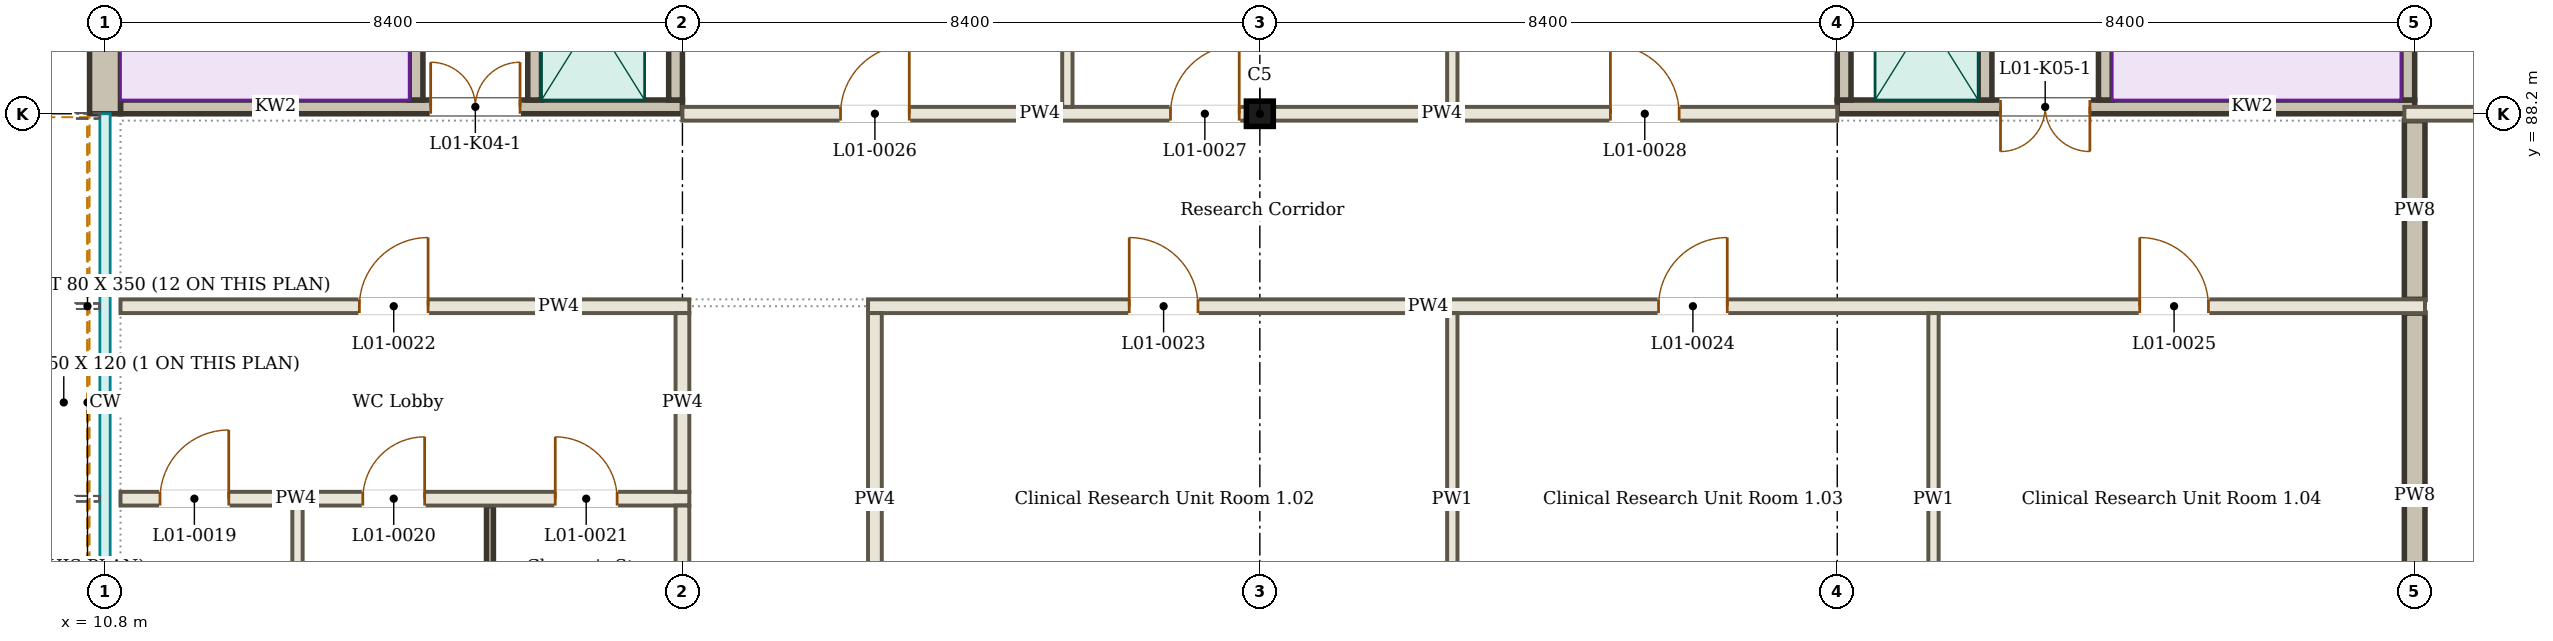
"""IFC4 building model, lengths in metres.
Left out: names, types, materials, properties, quantities, classifications, styles, units other than length and angle.
Written with IfcOpenShell. Run it as: python <this file> out.ifc"""

import sys

from ifc_helpers import new_model, si_unit, direction, frame, frame_2d, origin, origin_2d, place, context, subcontext, project, spatial, rectangle, i_section, extrude, element, fill, save


model = new_model("IFC4")
c1 = context("Model", 3, precision=1e-05, world=origin(), true_north=direction((0.0, 1.0)))
c2 = subcontext(c1, "Body", "Model", "MODEL_VIEW")
j1 = project(units=[si_unit("LENGTHUNIT", "METRE"), si_unit("PLANEANGLEUNIT", "RADIAN")], contexts=[c1])
p1 = place(None, origin())
s1 = spatial("IfcSite", under=j1, at=p1, CompositionType="ELEMENT")
p2 = place(p1, origin())
s2 = spatial("IfcBuilding", under=s1, at=p2, CompositionType="ELEMENT")
p3 = place(p2, frame((0.0, 0.0, 4.5)))
s3 = spatial("IfcBuildingStorey", under=s2, at=p3, CompositionType="ELEMENT", Elevation=4.5)
p4 = place(p3, frame((27.6, 88.2, 0.0), z_axis=(0.0, 0.0, 1.0), x_axis=(1.0, 0.0, 0.0)))
e1 = element("IfcColumn", 1, at=p4, inside=s3, PredefinedType="COLUMN", context=c2, shape_type="SweptSolid", body=[
    extrude(i_section(OverallWidth=0.391, OverallDepth=0.368, WebThickness=0.015, FlangeThickness=0.024, FilletRadius=0.027, at=origin_2d()), origin(), (0.0, 0.0, 1.0), 4.5),
])
p5 = place(p3, frame((10.64, 79.8, 3.87), z_axis=(0.0, 0.0, 1.0), x_axis=(0.0, 1.0, 0.0)))
e2 = element("IfcWall", 2, at=p5, inside=s3, PredefinedType="SOLIDWALL", context=c2, shape_type="SweptSolid", body=[
    extrude(rectangle(XDim=8.4, YDim=0.13, at=frame_2d((4.2, 0.0))), origin(), (0.0, 0.0, 1.0), 0.63),
])
p6 = place(p3, frame((11.025, 82.6, 0.0), z_axis=(0.0, 0.0, 1.0), x_axis=(1.0, 0.0, 0.0)))
e3 = element("IfcWall", 3, at=p6, inside=s3, PredefinedType="PARTITIONING", context=c2, shape_type="SweptSolid", body=[
    extrude(rectangle(XDim=8.275, YDim=0.2, at=frame_2d((4.138, 0.0))), origin(), (0.0, 0.0, 1.0), 3.8),
])
p7 = place(p6, frame((0.575, 0.0, 0.0)))
e4 = element("IfcOpeningElement", 4, at=p7, cuts=e3, PredefinedType="OPENING", context=c2, shape_type="SweptSolid", body=[
    extrude(rectangle(XDim=1.0, YDim=2.1, at=frame_2d((0.5, 1.05))), frame((0.0, 0.11, 0.0), z_axis=(0.0, -1.0, 0.0), x_axis=(1.0, 0.0, 0.0)), (0.0, 0.0, 1.0), 0.22),
])
p8 = place(p6, frame((3.525, 0.0, 0.0)))
e5 = element("IfcOpeningElement", 5, at=p8, cuts=e3, PredefinedType="OPENING", context=c2, shape_type="SweptSolid", body=[
    extrude(rectangle(XDim=0.9, YDim=2.1, at=frame_2d((0.45, 1.05))), frame((0.0, 0.11, 0.0), z_axis=(0.0, -1.0, 0.0), x_axis=(1.0, 0.0, 0.0)), (0.0, 0.0, 1.0), 0.22),
])
p9 = place(p6, frame((6.325, 0.0, 0.0)))
e6 = element("IfcOpeningElement", 6, at=p9, cuts=e3, PredefinedType="OPENING", context=c2, shape_type="SweptSolid", body=[
    extrude(rectangle(XDim=0.9, YDim=2.1, at=frame_2d((0.45, 1.05))), frame((0.0, 0.11, 0.0), z_axis=(0.0, -1.0, 0.0), x_axis=(1.0, 0.0, 0.0)), (0.0, 0.0, 1.0), 0.22),
])
p10 = place(p3, frame((11.025, 85.4, 0.0), z_axis=(0.0, 0.0, 1.0), x_axis=(1.0, 0.0, 0.0)))
e7 = element("IfcWall", 7, at=p10, inside=s3, PredefinedType="PARTITIONING", context=c2, shape_type="SweptSolid", body=[
    extrude(rectangle(XDim=8.275, YDim=0.2, at=frame_2d((4.138, 0.0))), origin(), (0.0, 0.0, 1.0), 3.8),
])
p11 = place(p10, frame((3.475, 0.0, 0.0)))
e8 = element("IfcOpeningElement", 8, at=p11, cuts=e7, PredefinedType="OPENING", context=c2, shape_type="SweptSolid", body=[
    extrude(rectangle(XDim=1.0, YDim=2.1, at=frame_2d((0.5, 1.05))), frame((0.0, 0.11, 0.0), z_axis=(0.0, -1.0, 0.0), x_axis=(1.0, 0.0, 0.0)), (0.0, 0.0, 1.0), 0.22),
])
p12 = place(p3, frame((21.9, 85.4, 0.0), z_axis=(0.0, 0.0, 1.0), x_axis=(1.0, 0.0, 0.0)))
e9 = element("IfcWall", 9, at=p12, inside=s3, PredefinedType="PARTITIONING", context=c2, shape_type="SweptSolid", body=[
    extrude(rectangle(XDim=22.65, YDim=0.2, at=frame_2d((11.325, 0.0))), origin(), (0.0, 0.0, 1.0), 3.8),
])
p13 = place(p12, frame((3.8, 0.0, 0.0)))
e10 = element("IfcOpeningElement", 10, at=p13, cuts=e9, PredefinedType="OPENING", context=c2, shape_type="SweptSolid", body=[
    extrude(rectangle(XDim=1.0, YDim=2.1, at=frame_2d((0.5, 1.05))), frame((0.0, 0.11, 0.0), z_axis=(0.0, -1.0, 0.0), x_axis=(1.0, 0.0, 0.0)), (0.0, 0.0, 1.0), 0.22),
])
p14 = place(p12, frame((11.5, 0.0, 0.0)))
e11 = element("IfcOpeningElement", 11, at=p14, cuts=e9, PredefinedType="OPENING", context=c2, shape_type="SweptSolid", body=[
    extrude(rectangle(XDim=1.0, YDim=2.1, at=frame_2d((0.5, 1.05))), frame((0.0, 0.11, 0.0), z_axis=(0.0, -1.0, 0.0), x_axis=(1.0, 0.0, 0.0)), (0.0, 0.0, 1.0), 0.22),
])
p15 = place(p12, frame((18.5, 0.0, 0.0)))
e12 = element("IfcOpeningElement", 12, at=p15, cuts=e9, PredefinedType="OPENING", context=c2, shape_type="SweptSolid", body=[
    extrude(rectangle(XDim=1.0, YDim=2.1, at=frame_2d((0.5, 1.05))), frame((0.0, 0.11, 0.0), z_axis=(0.0, -1.0, 0.0), x_axis=(1.0, 0.0, 0.0)), (0.0, 0.0, 1.0), 0.22),
])
p16 = place(p3, frame((19.2, 88.2, 0.0), z_axis=(0.0, 0.0, 1.0), x_axis=(1.0, 0.0, 0.0)))
e13 = element("IfcWall", 13, at=p16, inside=s3, PredefinedType="PARTITIONING", context=c2, shape_type="SweptSolid", body=[
    extrude(rectangle(XDim=8.205, YDim=0.2, at=frame_2d((4.102, 0.0))), origin(), (0.0, 0.0, 1.0), 3.8),
])
p17 = place(p16, frame((2.3, 0.0, 0.0)))
e14 = element("IfcOpeningElement", 14, at=p17, cuts=e13, PredefinedType="OPENING", context=c2, shape_type="SweptSolid", body=[
    extrude(rectangle(XDim=1.0, YDim=2.1, at=frame_2d((0.5, 1.05))), frame((0.0, 0.11, 0.0), z_axis=(0.0, -1.0, 0.0), x_axis=(1.0, 0.0, 0.0)), (0.0, 0.0, 1.0), 0.22),
])
p18 = place(p16, frame((7.1, 0.0, 0.0)))
e15 = element("IfcOpeningElement", 15, at=p18, cuts=e13, PredefinedType="OPENING", context=c2, shape_type="SweptSolid", body=[
    extrude(rectangle(XDim=1.0, YDim=2.1, at=frame_2d((0.5, 1.05))), frame((0.0, 0.11, 0.0), z_axis=(0.0, -1.0, 0.0), x_axis=(1.0, 0.0, 0.0)), (0.0, 0.0, 1.0), 0.22),
])
p19 = place(p3, frame((27.795, 88.2, 0.0), z_axis=(0.0, 0.0, 1.0), x_axis=(1.0, 0.0, 0.0)))
e16 = element("IfcWall", 16, at=p19, inside=s3, PredefinedType="PARTITIONING", context=c2, shape_type="SweptSolid", body=[
    extrude(rectangle(XDim=8.205, YDim=0.2, at=frame_2d((4.102, 0.0))), origin(), (0.0, 0.0, 1.0), 3.8),
])
p20 = place(p19, frame((4.905, 0.0, 0.0)))
e17 = element("IfcOpeningElement", 17, at=p20, cuts=e16, PredefinedType="OPENING", context=c2, shape_type="SweptSolid", body=[
    extrude(rectangle(XDim=1.0, YDim=2.1, at=frame_2d((0.5, 1.05))), frame((0.0, 0.11, 0.0), z_axis=(0.0, -1.0, 0.0), x_axis=(1.0, 0.0, 0.0)), (0.0, 0.0, 1.0), 0.22),
])
p21 = place(p3, frame((44.25, 88.2, 0.0), z_axis=(0.0, 0.0, 1.0), x_axis=(1.0, 0.0, 0.0)))
e18 = element("IfcWall", 18, at=p21, inside=s3, PredefinedType="PARTITIONING", context=c2, shape_type="SweptSolid", body=[
    extrude(rectangle(XDim=8.37, YDim=0.2, at=frame_2d((4.185, 0.0))), origin(), (0.0, 0.0, 1.0), 3.8),
])
p22 = place(p21, frame((3.75, 0.0, 0.0)))
e19 = element("IfcOpeningElement", 19, at=p22, cuts=e18, PredefinedType="OPENING", context=c2, shape_type="SweptSolid", body=[
    extrude(rectangle(XDim=1.0, YDim=2.1, at=frame_2d((0.5, 1.05))), frame((0.0, 0.11, 0.0), z_axis=(0.0, -1.0, 0.0), x_axis=(1.0, 0.0, 0.0)), (0.0, 0.0, 1.0), 0.22),
])
p23 = place(p3, frame((13.6, 79.8, 0.0), z_axis=(0.0, 0.0, 1.0), x_axis=(0.0, 1.0, 0.0)))
e20 = element("IfcWall", 20, at=p23, inside=s3, PredefinedType="PARTITIONING", context=c2, shape_type="SweptSolid", body=[
    extrude(rectangle(XDim=2.7, YDim=0.15, at=frame_2d((1.35, 0.0))), origin(), (0.0, 0.0, 1.0), 3.95),
])
p24 = place(p3, frame((16.4, 79.8, 0.0), z_axis=(0.0, 0.0, 1.0), x_axis=(0.0, 1.0, 0.0)))
e21 = element("IfcWall", 21, at=p24, inside=s3, PredefinedType="SOLIDWALL", context=c2, shape_type="SweptSolid", body=[
    extrude(rectangle(XDim=2.7, YDim=0.1, at=frame_2d((1.35, 0.0))), origin(), (0.0, 0.0, 1.0), 3.95),
])
p25 = place(p3, frame((19.2, 79.8, 0.0), z_axis=(0.0, 0.0, 1.0), x_axis=(0.0, 1.0, 0.0)))
e22 = element("IfcWall", 22, at=p25, inside=s3, PredefinedType="PARTITIONING", context=c2, shape_type="SweptSolid", body=[
    extrude(rectangle(XDim=2.7, YDim=0.2, at=frame_2d((1.35, 0.0))), origin(), (0.0, 0.0, 1.0), 3.8),
])
p26 = place(p3, frame((19.2, 82.7, 0.0), z_axis=(0.0, 0.0, 1.0), x_axis=(0.0, 1.0, 0.0)))
e23 = element("IfcWall", 23, at=p26, inside=s3, PredefinedType="PARTITIONING", context=c2, shape_type="SweptSolid", body=[
    extrude(rectangle(XDim=2.6, YDim=0.2, at=frame_2d((1.3, 0.0))), origin(), (0.0, 0.0, 1.0), 3.8),
])
p27 = place(p3, frame((22.0, 79.875, 0.0), z_axis=(0.0, 0.0, 1.0), x_axis=(0.0, 1.0, 0.0)))
e24 = element("IfcWall", 24, at=p27, inside=s3, PredefinedType="PARTITIONING", context=c2, shape_type="SweptSolid", body=[
    extrude(rectangle(XDim=5.425, YDim=0.2, at=frame_2d((2.712, 0.0))), origin(), (0.0, 0.0, 1.0), 3.8),
])
p28 = place(p3, frame((24.8, 88.3, 0.0), z_axis=(0.0, 0.0, 1.0), x_axis=(0.0, 1.0, 0.0)))
e25 = element("IfcWall", 25, at=p28, inside=s3, PredefinedType="PARTITIONING", context=c2, shape_type="SweptSolid", body=[
    extrude(rectangle(XDim=8.075, YDim=0.15, at=frame_2d((4.038, 0.0))), origin(), (0.0, 0.0, 1.0), 3.8),
])
p29 = place(p3, frame((30.4, 79.875, 0.0), z_axis=(0.0, 0.0, 1.0), x_axis=(0.0, 1.0, 0.0)))
e26 = element("IfcWall", 26, at=p29, inside=s3, PredefinedType="PARTITIONING", context=c2, shape_type="SweptSolid", body=[
    extrude(rectangle(XDim=5.425, YDim=0.15, at=frame_2d((2.712, 0.0))), origin(), (0.0, 0.0, 1.0), 3.8),
])
p30 = place(p3, frame((30.4, 88.3, 0.0), z_axis=(0.0, 0.0, 1.0), x_axis=(0.0, 1.0, 0.0)))
e27 = element("IfcWall", 27, at=p30, inside=s3, PredefinedType="PARTITIONING", context=c2, shape_type="SweptSolid", body=[
    extrude(rectangle(XDim=8.075, YDim=0.15, at=frame_2d((4.038, 0.0))), origin(), (0.0, 0.0, 1.0), 3.8),
])
p31 = place(p3, frame((37.4, 79.875, 0.0), z_axis=(0.0, 0.0, 1.0), x_axis=(0.0, 1.0, 0.0)))
e28 = element("IfcWall", 28, at=p31, inside=s3, PredefinedType="PARTITIONING", context=c2, shape_type="SweptSolid", body=[
    extrude(rectangle(XDim=5.425, YDim=0.15, at=frame_2d((2.712, 0.0))), origin(), (0.0, 0.0, 1.0), 3.8),
])
p32 = place(p3, frame((44.4, 79.996, 0.0), z_axis=(0.0, 0.0, 1.0), x_axis=(0.0, 1.0, 0.0)))
e29 = element("IfcWall", 29, at=p32, inside=s3, PredefinedType="SOLIDWALL", context=c2, shape_type="SweptSolid", body=[
    extrude(rectangle(XDim=5.304, YDim=0.3, at=frame_2d((2.652, 0.0))), origin(), (0.0, 0.0, 1.0), 3.85),
])
p33 = place(p3, frame((44.4, 85.5, 0.0), z_axis=(0.0, 0.0, 1.0), x_axis=(0.0, 1.0, 0.0)))
e30 = element("IfcWall", 30, at=p33, inside=s3, PredefinedType="SOLIDWALL", context=c2, shape_type="SweptSolid", body=[
    extrude(rectangle(XDim=2.6, YDim=0.3, at=frame_2d((1.3, 0.0))), origin(), (0.0, 0.0, 1.0), 3.8),
])
p34 = place(p3, frame((11.025, 88.3, 0.0), z_axis=(0.0, 0.0, 1.0), x_axis=(1.0, 0.0, 0.0)))
e31 = element("IfcWall", 31, at=p34, inside=s3, PredefinedType="SOLIDWALL", context=c2, shape_type="SweptSolid", body=[
    extrude(rectangle(XDim=8.175, YDim=0.2, at=frame_2d((4.087, 0.0))), origin(), (0.0, 0.0, 1.0), 4.5),
])
p35 = place(p34, frame((4.512, 0.0, 0.0)))
e32 = element("IfcOpeningElement", 32, at=p35, cuts=e31, PredefinedType="OPENING", context=c2, shape_type="SweptSolid", body=[
    extrude(rectangle(XDim=1.3, YDim=2.1, at=frame_2d((0.65, 1.05))), frame((0.0, 0.11, 0.0), z_axis=(0.0, -1.0, 0.0), x_axis=(1.0, 0.0, 0.0)), (0.0, 0.0, 1.0), 0.22),
])
p36 = place(p3, frame((10.8, 88.2, 0.0), z_axis=(0.0, 0.0, 1.0), x_axis=(0.0, 1.0, 0.0)))
e33 = element("IfcWall", 33, at=p36, inside=s3, PredefinedType="SOLIDWALL", context=c2, shape_type="SweptSolid", body=[
    extrude(rectangle(XDim=8.175, YDim=0.45, at=frame_2d((4.087, 0.0))), origin(), (0.0, 0.0, 1.0), 4.5),
])
p37 = place(p3, frame((19.1, 88.4, 0.0), z_axis=(0.0, 0.0, 1.0), x_axis=(0.0, 1.0, 0.0)))
e34 = element("IfcWall", 34, at=p37, inside=s3, PredefinedType="SOLIDWALL", context=c2, shape_type="SweptSolid", body=[
    extrude(rectangle(XDim=7.975, YDim=0.2, at=frame_2d((3.988, 0.0))), origin(), (0.0, 0.0, 1.0), 4.5),
])
p38 = place(p3, frame((15.325, 88.4, 0.0), z_axis=(0.0, 0.0, 1.0), x_axis=(0.0, 1.0, 0.0)))
e35 = element("IfcWall", 35, at=p38, inside=s3, PredefinedType="SOLIDWALL", context=c2, shape_type="SweptSolid", body=[
    extrude(rectangle(XDim=7.975, YDim=0.2, at=frame_2d((3.988, 0.0))), origin(), (0.0, 0.0, 1.0), 4.5),
])
p39 = place(p38, frame((6.538, 0.0, 0.0)))
e36 = element("IfcOpeningElement", 36, at=p39, cuts=e35, PredefinedType="OPENING", context=c2, shape_type="SweptSolid", body=[
    extrude(rectangle(XDim=1.1, YDim=2.1, at=frame_2d((0.55, 1.05))), frame((0.0, 0.11, 0.0), z_axis=(0.0, -1.0, 0.0), x_axis=(1.0, 0.0, 0.0)), (0.0, 0.0, 1.0), 0.22),
])
p40 = place(p3, frame((17.05, 88.4, 0.0), z_axis=(0.0, 0.0, 1.0), x_axis=(0.0, 1.0, 0.0)))
e37 = element("IfcWall", 37, at=p40, inside=s3, PredefinedType="SOLIDWALL", context=c2, shape_type="SweptSolid", body=[
    extrude(rectangle(XDim=2.95, YDim=0.2, at=frame_2d((1.475, 0.0))), origin(), (0.0, 0.0, 1.0), 4.5),
])
p41 = place(p3, frame((44.4, 88.3, 0.0), z_axis=(0.0, 0.0, 1.0), x_axis=(-1.0, 0.0, 0.0)))
e38 = element("IfcWall", 38, at=p41, inside=s3, PredefinedType="SOLIDWALL", context=c2, shape_type="SweptSolid", body=[
    extrude(rectangle(XDim=8.4, YDim=0.2, at=frame_2d((4.2, 0.0))), origin(), (0.0, 0.0, 1.0), 4.5),
])
p42 = place(p41, frame((4.725, 0.0, 0.0)))
e39 = element("IfcOpeningElement", 39, at=p42, cuts=e38, PredefinedType="OPENING", context=c2, shape_type="SweptSolid", body=[
    extrude(rectangle(XDim=1.3, YDim=2.1, at=frame_2d((0.65, 1.05))), frame((0.0, 0.11, 0.0), z_axis=(0.0, -1.0, 0.0), x_axis=(1.0, 0.0, 0.0)), (0.0, 0.0, 1.0), 0.22),
])
for number, where, z_axis, x_axis in (
    (40, (44.3, 88.4, 0.0), (0.0, 0.0, 1.0), (0.0, 1.0, 0.0)),
    (41, (36.1, 88.4, 0.0), (0.0, 0.0, 1.0), (0.0, 1.0, 0.0)),
):
    element("IfcWall", number, at=place(p3, frame(where, z_axis=z_axis, x_axis=x_axis)), inside=s3, PredefinedType="SOLIDWALL", context=c2, shape_type="SweptSolid", body=[
        extrude(rectangle(XDim=7.975, YDim=0.2, at=frame_2d((3.988, 0.0))), origin(), (0.0, 0.0, 1.0), 4.5),
    ])
p43 = place(p3, frame((39.9, 88.4, 0.0), z_axis=(0.0, 0.0, 1.0), x_axis=(0.0, 1.0, 0.0)))
e42 = element("IfcWall", 42, at=p43, inside=s3, PredefinedType="SOLIDWALL", context=c2, shape_type="SweptSolid", body=[
    extrude(rectangle(XDim=7.975, YDim=0.2, at=frame_2d((3.988, 0.0))), origin(), (0.0, 0.0, 1.0), 4.5),
])
p44 = place(p43, frame((6.538, 0.0, 0.0)))
e43 = element("IfcOpeningElement", 43, at=p44, cuts=e42, PredefinedType="OPENING", context=c2, shape_type="SweptSolid", body=[
    extrude(rectangle(XDim=1.1, YDim=2.1, at=frame_2d((0.55, 1.05))), frame((0.0, 0.11, 0.0), z_axis=(0.0, -1.0, 0.0), x_axis=(1.0, 0.0, 0.0)), (0.0, 0.0, 1.0), 0.22),
])
p45 = place(p3, frame((38.15, 88.4, 0.0), z_axis=(0.0, 0.0, 1.0), x_axis=(0.0, 1.0, 0.0)))
e44 = element("IfcWall", 44, at=p45, inside=s3, PredefinedType="SOLIDWALL", context=c2, shape_type="SweptSolid", body=[
    extrude(rectangle(XDim=2.95, YDim=0.2, at=frame_2d((1.475, 0.0))), origin(), (0.0, 0.0, 1.0), 4.5),
])
p46 = place(p7, origin())
e45 = element("IfcDoor", 45, at=p46, inside=s3, OperationType="SINGLE_SWING_RIGHT", PredefinedType="DOOR", context=c2, shape_type="SweptSolid", body=[
    extrude(rectangle(XDim=1.0, YDim=2.1, at=frame_2d((0.5, 1.05))), frame((0.0, 0.025, 0.0), z_axis=(0.0, -1.0, 0.0), x_axis=(1.0, 0.0, 0.0)), (0.0, 0.0, 1.0), 0.05),
])
fill(e4, e45)
p47 = place(p8, origin())
e46 = element("IfcDoor", 46, at=p47, inside=s3, OperationType="SINGLE_SWING_RIGHT", PredefinedType="DOOR", context=c2, shape_type="SweptSolid", body=[
    extrude(rectangle(XDim=0.9, YDim=2.1, at=frame_2d((0.45, 1.05))), frame((0.0, 0.025, 0.0), z_axis=(0.0, -1.0, 0.0), x_axis=(1.0, 0.0, 0.0)), (0.0, 0.0, 1.0), 0.05),
])
fill(e5, e46)
p48 = place(p9, origin())
e47 = element("IfcDoor", 47, at=p48, inside=s3, OperationType="SINGLE_SWING_LEFT", PredefinedType="DOOR", context=c2, shape_type="SweptSolid", body=[
    extrude(rectangle(XDim=0.9, YDim=2.1, at=frame_2d((0.45, 1.05))), frame((0.0, 0.025, 0.0), z_axis=(0.0, -1.0, 0.0), x_axis=(1.0, 0.0, 0.0)), (0.0, 0.0, 1.0), 0.05),
])
fill(e6, e47)
p49 = place(p11, origin())
e48 = element("IfcDoor", 48, at=p49, inside=s3, OperationType="SINGLE_SWING_RIGHT", PredefinedType="DOOR", context=c2, shape_type="SweptSolid", body=[
    extrude(rectangle(XDim=1.0, YDim=2.1, at=frame_2d((0.5, 1.05))), frame((0.0, 0.025, 0.0), z_axis=(0.0, -1.0, 0.0), x_axis=(1.0, 0.0, 0.0)), (0.0, 0.0, 1.0), 0.05),
])
fill(e8, e48)
p50 = place(p13, origin())
e49 = element("IfcDoor", 49, at=p50, inside=s3, OperationType="SINGLE_SWING_LEFT", PredefinedType="DOOR", context=c2, shape_type="SweptSolid", body=[
    extrude(rectangle(XDim=1.0, YDim=2.1, at=frame_2d((0.5, 1.05))), frame((0.0, 0.025, 0.0), z_axis=(0.0, -1.0, 0.0), x_axis=(1.0, 0.0, 0.0)), (0.0, 0.0, 1.0), 0.05),
])
fill(e10, e49)
p51 = place(p14, origin())
e50 = element("IfcDoor", 50, at=p51, inside=s3, OperationType="SINGLE_SWING_RIGHT", PredefinedType="DOOR", context=c2, shape_type="SweptSolid", body=[
    extrude(rectangle(XDim=1.0, YDim=2.1, at=frame_2d((0.5, 1.05))), frame((0.0, 0.025, 0.0), z_axis=(0.0, -1.0, 0.0), x_axis=(1.0, 0.0, 0.0)), (0.0, 0.0, 1.0), 0.05),
])
fill(e11, e50)
p52 = place(p15, origin())
e51 = element("IfcDoor", 51, at=p52, inside=s3, OperationType="SINGLE_SWING_LEFT", PredefinedType="DOOR", context=c2, shape_type="SweptSolid", body=[
    extrude(rectangle(XDim=1.0, YDim=2.1, at=frame_2d((0.5, 1.05))), frame((0.0, 0.025, 0.0), z_axis=(0.0, -1.0, 0.0), x_axis=(1.0, 0.0, 0.0)), (0.0, 0.0, 1.0), 0.05),
])
fill(e12, e51)
p53 = place(p17, origin())
e52 = element("IfcDoor", 52, at=p53, inside=s3, OperationType="SINGLE_SWING_RIGHT", PredefinedType="DOOR", context=c2, shape_type="SweptSolid", body=[
    extrude(rectangle(XDim=1.0, YDim=2.1, at=frame_2d((0.5, 1.05))), frame((0.0, 0.025, 0.0), z_axis=(0.0, -1.0, 0.0), x_axis=(1.0, 0.0, 0.0)), (0.0, 0.0, 1.0), 0.05),
])
fill(e14, e52)
p54 = place(p18, origin())
e53 = element("IfcDoor", 53, at=p54, inside=s3, OperationType="SINGLE_SWING_RIGHT", PredefinedType="DOOR", context=c2, shape_type="SweptSolid", body=[
    extrude(rectangle(XDim=1.0, YDim=2.1, at=frame_2d((0.5, 1.05))), frame((0.0, 0.025, 0.0), z_axis=(0.0, -1.0, 0.0), x_axis=(1.0, 0.0, 0.0)), (0.0, 0.0, 1.0), 0.05),
])
fill(e15, e53)
p55 = place(p20, origin())
e54 = element("IfcDoor", 54, at=p55, inside=s3, OperationType="SINGLE_SWING_LEFT", PredefinedType="DOOR", context=c2, shape_type="SweptSolid", body=[
    extrude(rectangle(XDim=1.0, YDim=2.1, at=frame_2d((0.5, 1.05))), frame((0.0, 0.025, 0.0), z_axis=(0.0, -1.0, 0.0), x_axis=(1.0, 0.0, 0.0)), (0.0, 0.0, 1.0), 0.05),
])
fill(e17, e54)
p56 = place(p35, origin())
e55 = element("IfcDoor", 55, at=p56, inside=s3, OperationType="DOUBLE_DOOR_DOUBLE_SWING", PredefinedType="DOOR", context=c2, shape_type="SweptSolid", body=[
    extrude(rectangle(XDim=1.3, YDim=2.1, at=frame_2d((0.65, 1.05))), frame((0.0, 0.025, 0.0), z_axis=(0.0, -1.0, 0.0), x_axis=(1.0, 0.0, 0.0)), (0.0, 0.0, 1.0), 0.05),
])
fill(e32, e55)
p57 = place(p42, origin())
e56 = element("IfcDoor", 56, at=p57, inside=s3, OperationType="DOUBLE_DOOR_DOUBLE_SWING", PredefinedType="DOOR", context=c2, shape_type="SweptSolid", body=[
    extrude(rectangle(XDim=1.3, YDim=2.1, at=frame_2d((0.65, 1.05))), frame((0.0, 0.025, 0.0), z_axis=(0.0, -1.0, 0.0), x_axis=(1.0, 0.0, 0.0)), (0.0, 0.0, 1.0), 0.05),
])
fill(e39, e56)
save(model, sys.argv[1])
